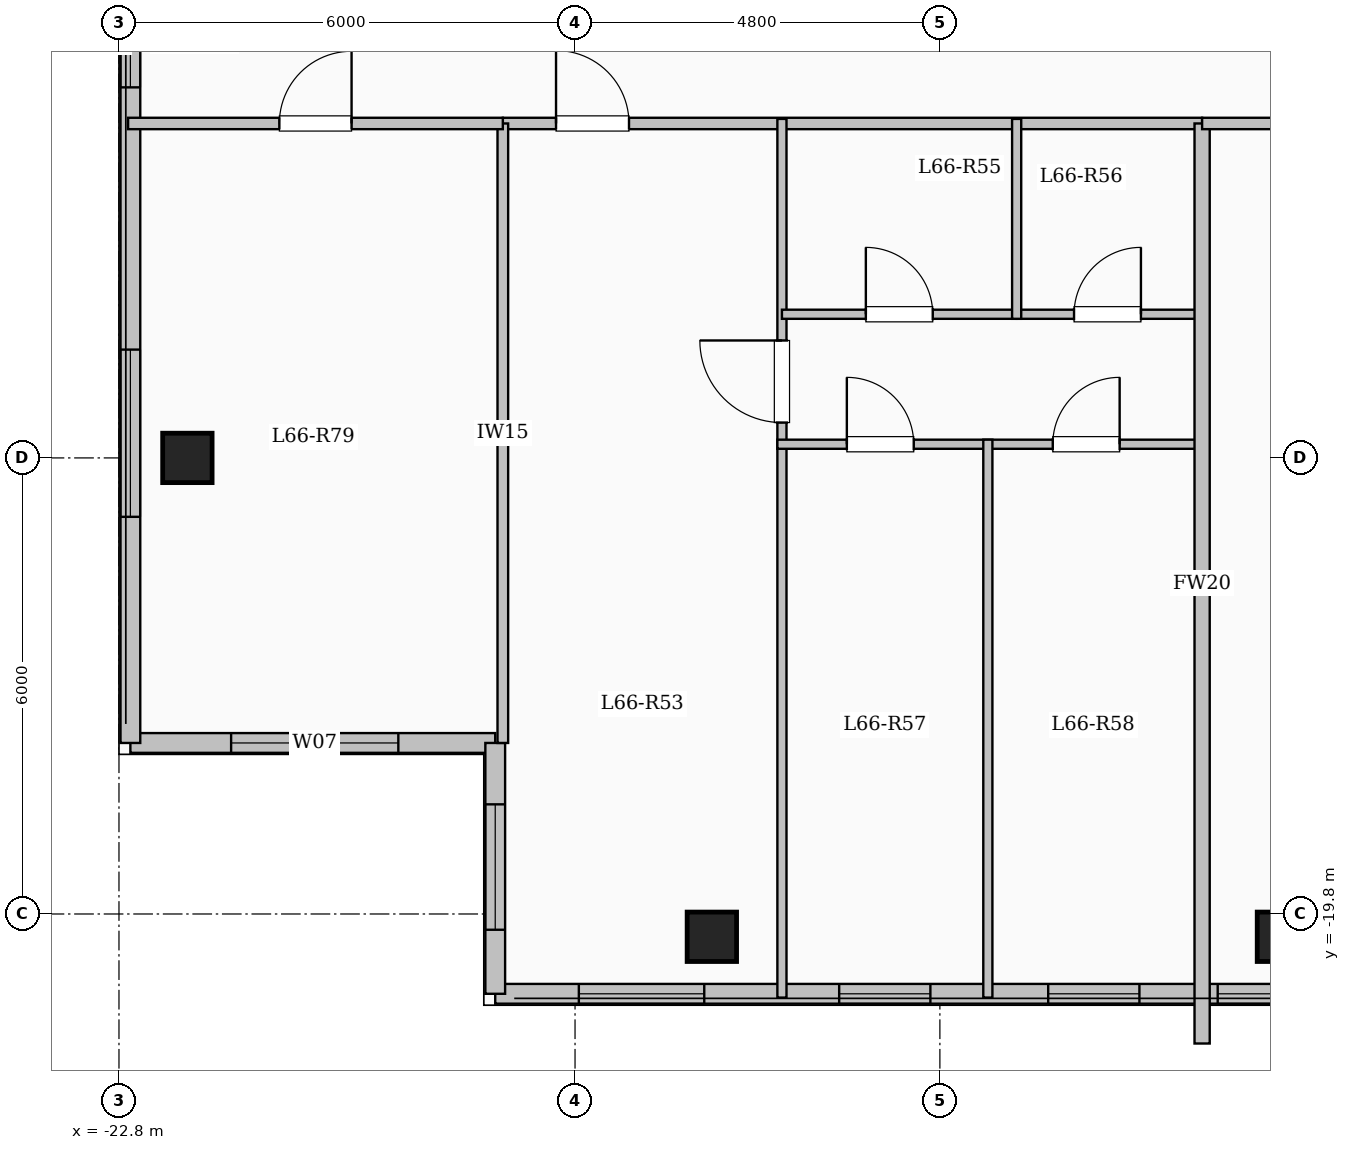
"""IFC4 building model, lengths in metres.
Left out: names, types, materials, properties, quantities, classifications, styles, units other than length and angle.
Written with IfcOpenShell. Run it as: python <this file> out.ifc"""

import sys

from ifc_helpers import new_model, si_unit, direction, frame, frame_2d, origin, origin_2d, place, context, subcontext, project, spatial, rectangle, extrude, element, fill, save


model = new_model("IFC4")
c1 = context("Model", 3, precision=1e-05, world=origin(), true_north=direction((0.0, 1.0)))
c2 = subcontext(c1, "Body", "Model", "MODEL_VIEW")
j1 = project(units=[si_unit("LENGTHUNIT", "METRE"), si_unit("PLANEANGLEUNIT", "RADIAN")], contexts=[c1])
p1 = place(None, origin())
s1 = spatial("IfcSite", under=j1, at=p1, CompositionType="ELEMENT")
p2 = place(p1, origin())
s2 = spatial("IfcBuilding", under=s1, at=p2, CompositionType="ELEMENT")
p3 = place(p2, frame((0.0, 0.0, 244.85)))
s3 = spatial("IfcBuildingStorey", under=s2, at=p3, CompositionType="ELEMENT", Elevation=244.85)
for number, where, z_axis, x_axis in (
    (1, (-15.0, -20.1, 0.0), (0.0, 0.0, 1.0), (1.0, 0.0, 0.0)),
    (2, (-7.5, -20.1, 0.0), (0.0, 0.0, 1.0), (1.0, 0.0, 0.0)),
    (3, (-21.9, -13.8, 0.0), (0.0, 0.0, 1.0), (1.0, 0.0, 0.0)),
):
    element("IfcColumn", number, at=place(p3, frame(where, z_axis=z_axis, x_axis=x_axis)), inside=s3, PredefinedType="COLUMN", context=c2, shape_type="SweptSolid", body=[
        extrude(rectangle(XDim=0.65, YDim=0.65, at=origin_2d()), origin(), (0.0, 0.0, 1.0), 3.35),
    ])
p4 = place(p3, frame((-17.85, -17.55, 0.0), z_axis=(0.0, 0.0, 1.0), x_axis=(-1.0, 0.0, 0.0)))
e4 = element("IfcWall", 4, at=p4, inside=s3, PredefinedType="SOLIDWALL", context=c2, shape_type="SweptSolid", body=[
    extrude(rectangle(XDim=4.8, YDim=0.26, at=frame_2d((2.4, 0.0))), origin(), (0.0, 0.0, 1.0), 3.1),
])
p5 = place(p4, frame((1.275, 0.0, 0.9)))
e5 = element("IfcOpeningElement", 5, at=p5, cuts=e4, PredefinedType="OPENING", context=c2, shape_type="SweptSolid", body=[
    extrude(rectangle(XDim=2.2, YDim=1.75, at=frame_2d((1.1, 0.875))), frame((0.0, 0.14, 0.0), z_axis=(0.0, -1.0, 0.0), x_axis=(1.0, 0.0, 0.0)), (0.0, 0.0, 1.0), 0.28),
])
p6 = place(p3, frame((-22.65, -17.55, 0.0), z_axis=(0.0, 0.0, 1.0), x_axis=(0.0, 1.0, 0.0)))
e6 = element("IfcWall", 6, at=p6, inside=s3, PredefinedType="SOLIDWALL", context=c2, shape_type="SweptSolid", body=[
    extrude(rectangle(XDim=35.1, YDim=0.26, at=frame_2d((17.55, 0.0))), origin(), (0.0, 0.0, 1.0), 3.1),
])
p7 = place(p6, frame((2.975, 0.0, 0.9)))
e7 = element("IfcOpeningElement", 7, at=p7, cuts=e6, PredefinedType="OPENING", context=c2, shape_type="SweptSolid", body=[
    extrude(rectangle(XDim=2.2, YDim=1.75, at=frame_2d((1.1, 0.875))), frame((0.0, 0.14, 0.0), z_axis=(0.0, -1.0, 0.0), x_axis=(1.0, 0.0, 0.0)), (0.0, 0.0, 1.0), 0.28),
])
p8 = place(p6, frame((8.625, 0.0, 0.95)))
e8 = element("IfcOpeningElement", 8, at=p8, cuts=e6, PredefinedType="OPENING", context=c2, shape_type="SweptSolid", body=[
    extrude(rectangle(XDim=1.2, YDim=1.5, at=frame_2d((0.6, 0.75))), frame((0.0, 0.14, 0.0), z_axis=(0.0, -1.0, 0.0), x_axis=(1.0, 0.0, 0.0)), (0.0, 0.0, 1.0), 0.28),
])
p9 = place(p6, frame((13.55, 0.0, 0.9)))
e9 = element("IfcOpeningElement", 9, at=p9, cuts=e6, PredefinedType="OPENING", context=c2, shape_type="SweptSolid", body=[
    extrude(rectangle(XDim=2.2, YDim=1.75, at=frame_2d((1.1, 0.875))), frame((0.0, 0.14, 0.0), z_axis=(0.0, -1.0, 0.0), x_axis=(1.0, 0.0, 0.0)), (0.0, 0.0, 1.0), 0.28),
])
p10 = place(p6, frame((19.95, 0.0, 0.9)))
e10 = element("IfcOpeningElement", 10, at=p10, cuts=e6, PredefinedType="OPENING", context=c2, shape_type="SweptSolid", body=[
    extrude(rectangle(XDim=1.65, YDim=1.6, at=frame_2d((0.825, 0.8))), frame((0.0, 0.14, 0.0), z_axis=(0.0, -1.0, 0.0), x_axis=(1.0, 0.0, 0.0)), (0.0, 0.0, 1.0), 0.28),
])
p11 = place(p6, frame((24.425, 0.0, 0.9)))
e11 = element("IfcOpeningElement", 11, at=p11, cuts=e6, PredefinedType="OPENING", context=c2, shape_type="SweptSolid", body=[
    extrude(rectangle(XDim=2.0, YDim=1.7, at=frame_2d((1.0, 0.85))), frame((0.0, 0.14, 0.0), z_axis=(0.0, -1.0, 0.0), x_axis=(1.0, 0.0, 0.0)), (0.0, 0.0, 1.0), 0.28),
])
p12 = place(p6, frame((28.675, 0.0, 0.95)))
e12 = element("IfcOpeningElement", 12, at=p12, cuts=e6, PredefinedType="OPENING", context=c2, shape_type="SweptSolid", body=[
    extrude(rectangle(XDim=1.0, YDim=1.5, at=frame_2d((0.5, 0.75))), frame((0.0, 0.14, 0.0), z_axis=(0.0, -1.0, 0.0), x_axis=(1.0, 0.0, 0.0)), (0.0, 0.0, 1.0), 0.28),
])
p13 = place(p6, frame((31.6, 0.0, 0.9)))
e13 = element("IfcOpeningElement", 13, at=p13, cuts=e6, PredefinedType="OPENING", context=c2, shape_type="SweptSolid", body=[
    extrude(rectangle(XDim=2.0, YDim=1.7, at=frame_2d((1.0, 0.85))), frame((0.0, 0.14, 0.0), z_axis=(0.0, -1.0, 0.0), x_axis=(1.0, 0.0, 0.0)), (0.0, 0.0, 1.0), 0.28),
])
p14 = place(p3, frame((-7.35, -20.85, 0.0), z_axis=(0.0, 0.0, 1.0), x_axis=(-1.0, 0.0, 0.0)))
e14 = element("IfcWall", 14, at=p14, inside=s3, PredefinedType="SOLIDWALL", context=c2, shape_type="SweptSolid", body=[
    extrude(rectangle(XDim=10.5, YDim=0.26, at=frame_2d((5.25, 0.0))), origin(), (0.0, 0.0, 1.0), 3.1),
])
p15 = place(p14, frame((0.145, 0.0, 0.95)))
e15 = element("IfcOpeningElement", 15, at=p15, cuts=e14, PredefinedType="OPENING", context=c2, shape_type="SweptSolid", body=[
    extrude(rectangle(XDim=0.85, YDim=1.5, at=frame_2d((0.425, 0.75))), frame((0.0, 0.14, 0.0), z_axis=(0.0, -1.0, 0.0), x_axis=(1.0, 0.0, 0.0)), (0.0, 0.0, 1.0), 0.28),
])
p16 = place(p14, frame((2.025, 0.0, 0.95)))
e16 = element("IfcOpeningElement", 16, at=p16, cuts=e14, PredefinedType="OPENING", context=c2, shape_type="SweptSolid", body=[
    extrude(rectangle(XDim=1.2, YDim=1.5, at=frame_2d((0.6, 0.75))), frame((0.0, 0.14, 0.0), z_axis=(0.0, -1.0, 0.0), x_axis=(1.0, 0.0, 0.0)), (0.0, 0.0, 1.0), 0.28),
])
p17 = place(p14, frame((4.775, 0.0, 0.95)))
e17 = element("IfcOpeningElement", 17, at=p17, cuts=e14, PredefinedType="OPENING", context=c2, shape_type="SweptSolid", body=[
    extrude(rectangle(XDim=1.2, YDim=1.5, at=frame_2d((0.6, 0.75))), frame((0.0, 0.14, 0.0), z_axis=(0.0, -1.0, 0.0), x_axis=(1.0, 0.0, 0.0)), (0.0, 0.0, 1.0), 0.28),
])
p18 = place(p14, frame((7.75, 0.0, 0.9)))
e18 = element("IfcOpeningElement", 18, at=p18, cuts=e14, PredefinedType="OPENING", context=c2, shape_type="SweptSolid", body=[
    extrude(rectangle(XDim=1.65, YDim=1.6, at=frame_2d((0.825, 0.8))), frame((0.0, 0.14, 0.0), z_axis=(0.0, -1.0, 0.0), x_axis=(1.0, 0.0, 0.0)), (0.0, 0.0, 1.0), 0.28),
])
p19 = place(p3, frame((-17.85, -20.85, 0.0), z_axis=(0.0, 0.0, 1.0), x_axis=(0.0, 1.0, 0.0)))
e19 = element("IfcWall", 19, at=p19, inside=s3, PredefinedType="SOLIDWALL", context=c2, shape_type="SweptSolid", body=[
    extrude(rectangle(XDim=3.3, YDim=0.26, at=frame_2d((1.65, 0.0))), origin(), (0.0, 0.0, 1.0), 3.1),
])
p20 = place(p19, frame((0.843, 0.0, 0.9)))
e20 = element("IfcOpeningElement", 20, at=p20, cuts=e19, PredefinedType="OPENING", context=c2, shape_type="SweptSolid", body=[
    extrude(rectangle(XDim=1.65, YDim=1.6, at=frame_2d((0.825, 0.8))), frame((0.0, 0.14, 0.0), z_axis=(0.0, -1.0, 0.0), x_axis=(1.0, 0.0, 0.0)), (0.0, 0.0, 1.0), 0.28),
])
p21 = place(p3, frame((-17.75, -9.4, 0.0), z_axis=(0.0, 0.0, 1.0), x_axis=(1.0, 0.0, 0.0)))
e21 = element("IfcWall", 21, at=p21, inside=s3, PredefinedType="PARTITIONING", context=c2, shape_type="SweptSolid", body=[
    extrude(rectangle(XDim=9.2, YDim=0.15, at=frame_2d((4.6, 0.0))), origin(), (0.0, 0.0, 1.0), 3.1),
])
p22 = place(p21, frame((0.7, 0.0, 0.0)))
e22 = element("IfcOpeningElement", 22, at=p22, cuts=e21, PredefinedType="OPENING", context=c2, shape_type="SweptSolid", body=[
    extrude(rectangle(XDim=0.96, YDim=2.15, at=frame_2d((0.48, 1.075))), frame((0.0, 0.085, 0.0), z_axis=(0.0, -1.0, 0.0), x_axis=(1.0, 0.0, 0.0)), (0.0, 0.0, 1.0), 0.17),
])
p23 = place(p3, frame((-14.078, -20.9, 0.0), z_axis=(0.0, 0.0, 1.0), x_axis=(0.0, 1.0, 0.0)))
e23 = element("IfcWall", 23, at=p23, inside=s3, PredefinedType="PARTITIONING", context=c2, shape_type="SweptSolid", body=[
    extrude(rectangle(XDim=11.56, YDim=0.12, at=frame_2d((5.78, 0.0))), origin(), (0.0, 0.0, 1.0), 3.1),
])
p24 = place(p23, frame((7.565, 0.0, 0.0)))
e24 = element("IfcOpeningElement", 24, at=p24, cuts=e23, PredefinedType="OPENING", context=c2, shape_type="SweptSolid", body=[
    extrude(rectangle(XDim=1.08, YDim=2.15, at=frame_2d((0.54, 1.075))), frame((0.0, 0.07, 0.0), z_axis=(0.0, -1.0, 0.0), x_axis=(1.0, 0.0, 0.0)), (0.0, 0.0, 1.0), 0.14),
])
p25 = place(p3, frame((-14.078, -11.91, 0.0), z_axis=(0.0, 0.0, 1.0), x_axis=(1.0, 0.0, 0.0)))
e25 = element("IfcWall", 25, at=p25, inside=s3, PredefinedType="PARTITIONING", context=c2, shape_type="SweptSolid", body=[
    extrude(rectangle(XDim=3.088, YDim=0.12, at=frame_2d((1.544, 0.0))), origin(), (0.0, 0.0, 1.0), 3.1),
])
p26 = place(p25, frame((1.104, 0.0, 0.0)))
e26 = element("IfcOpeningElement", 26, at=p26, cuts=e25, PredefinedType="OPENING", context=c2, shape_type="SweptSolid", body=[
    extrude(rectangle(XDim=0.88, YDim=2.1, at=frame_2d((0.44, 1.05))), frame((0.0, 0.07, 0.0), z_axis=(0.0, -1.0, 0.0), x_axis=(1.0, 0.0, 0.0)), (0.0, 0.0, 1.0), 0.14),
])
p27 = place(p3, frame((-10.99, -11.91, 0.0), z_axis=(0.0, 0.0, 1.0), x_axis=(1.0, 0.0, 0.0)))
e27 = element("IfcWall", 27, at=p27, inside=s3, PredefinedType="PARTITIONING", context=c2, shape_type="SweptSolid", body=[
    extrude(rectangle(XDim=2.39, YDim=0.12, at=frame_2d((1.195, 0.0))), origin(), (0.0, 0.0, 1.0), 3.1),
])
p28 = place(p27, frame((0.755, 0.0, 0.0)))
e28 = element("IfcOpeningElement", 28, at=p28, cuts=e27, PredefinedType="OPENING", context=c2, shape_type="SweptSolid", body=[
    extrude(rectangle(XDim=0.88, YDim=2.1, at=frame_2d((0.44, 1.05))), frame((0.0, 0.07, 0.0), z_axis=(0.0, -1.0, 0.0), x_axis=(1.0, 0.0, 0.0)), (0.0, 0.0, 1.0), 0.14),
])
p29 = place(p3, frame((-14.138, -13.62, 0.0), z_axis=(0.0, 0.0, 1.0), x_axis=(1.0, 0.0, 0.0)))
e29 = element("IfcWall", 29, at=p29, inside=s3, PredefinedType="PARTITIONING", context=c2, shape_type="SweptSolid", body=[
    extrude(rectangle(XDim=5.598, YDim=0.12, at=frame_2d((2.799, 0.0))), origin(), (0.0, 0.0, 1.0), 3.1),
])
p30 = place(p29, frame((0.914, 0.0, 0.0)))
e30 = element("IfcOpeningElement", 30, at=p30, cuts=e29, PredefinedType="OPENING", context=c2, shape_type="SweptSolid", body=[
    extrude(rectangle(XDim=0.88, YDim=2.1, at=frame_2d((0.44, 1.05))), frame((0.0, 0.07, 0.0), z_axis=(0.0, -1.0, 0.0), x_axis=(1.0, 0.0, 0.0)), (0.0, 0.0, 1.0), 0.14),
])
p31 = place(p29, frame((3.623, 0.0, 0.0)))
e31 = element("IfcOpeningElement", 31, at=p31, cuts=e29, PredefinedType="OPENING", context=c2, shape_type="SweptSolid", body=[
    extrude(rectangle(XDim=0.88, YDim=2.1, at=frame_2d((0.44, 1.05))), frame((0.0, 0.07, 0.0), z_axis=(0.0, -1.0, 0.0), x_axis=(1.0, 0.0, 0.0)), (0.0, 0.0, 1.0), 0.14),
])
p32 = place(p3, frame((-10.99, -11.97, 0.0), z_axis=(0.0, 0.0, 1.0), x_axis=(0.0, 1.0, 0.0)))
e32 = element("IfcWall", 32, at=p32, inside=s3, PredefinedType="PARTITIONING", context=c2, shape_type="SweptSolid", body=[
    extrude(rectangle(XDim=2.63, YDim=0.12, at=frame_2d((1.315, 0.0))), origin(), (0.0, 0.0, 1.0), 3.1),
])
p33 = place(p3, frame((-11.369, -20.9, 0.0), z_axis=(0.0, 0.0, 1.0), x_axis=(0.0, 1.0, 0.0)))
e33 = element("IfcWall", 33, at=p33, inside=s3, PredefinedType="PARTITIONING", context=c2, shape_type="SweptSolid", body=[
    extrude(rectangle(XDim=7.34, YDim=0.12, at=frame_2d((3.67, 0.0))), origin(), (0.0, 0.0, 1.0), 3.1),
])
p34 = place(p3, frame((-8.55, -21.504, 0.0), z_axis=(0.0, 0.0, 1.0), x_axis=(0.0, 1.0, 0.0)))
e34 = element("IfcWall", 34, at=p34, inside=s3, PredefinedType="SOLIDWALL", context=c2, shape_type="SweptSolid", body=[
    extrude(rectangle(XDim=12.104, YDim=0.2, at=frame_2d((6.052, 0.0))), origin(), (0.0, 0.0, 1.0), 3.1),
])
p35 = place(p3, frame((-8.55, -9.4, 0.0), z_axis=(0.0, 0.0, 1.0), x_axis=(1.0, 0.0, 0.0)))
e35 = element("IfcWall", 35, at=p35, inside=s3, PredefinedType="PARTITIONING", context=c2, shape_type="SweptSolid", body=[
    extrude(rectangle(XDim=17.1, YDim=0.15, at=frame_2d((8.55, 0.0))), origin(), (0.0, 0.0, 1.0), 3.1),
])
p36 = place(p35, frame((1.75, 0.0, 0.0)))
e36 = element("IfcOpeningElement", 36, at=p36, cuts=e35, PredefinedType="OPENING", context=c2, shape_type="SweptSolid", body=[
    extrude(rectangle(XDim=0.96, YDim=2.15, at=frame_2d((0.48, 1.075))), frame((0.0, 0.085, 0.0), z_axis=(0.0, -1.0, 0.0), x_axis=(1.0, 0.0, 0.0)), (0.0, 0.0, 1.0), 0.17),
])
p37 = place(p3, frame((-17.75, -17.55, 0.0), z_axis=(0.0, 0.0, 1.0), x_axis=(0.0, 1.0, 0.0)))
e37 = element("IfcWall", 37, at=p37, inside=s3, PredefinedType="PARTITIONING", context=c2, shape_type="SweptSolid", body=[
    extrude(rectangle(XDim=8.15, YDim=0.14, at=frame_2d((4.075, 0.0))), origin(), (0.0, 0.0, 1.0), 3.1),
])
p38 = place(p3, frame((-22.68, -9.4, 0.0), z_axis=(0.0, 0.0, 1.0), x_axis=(1.0, 0.0, 0.0)))
e38 = element("IfcWall", 38, at=p38, inside=s3, PredefinedType="PARTITIONING", context=c2, shape_type="SweptSolid", body=[
    extrude(rectangle(XDim=4.93, YDim=0.15, at=frame_2d((2.465, 0.0))), origin(), (0.0, 0.0, 1.0), 3.1),
])
p39 = place(p38, frame((1.99, 0.0, 0.0)))
e39 = element("IfcOpeningElement", 39, at=p39, cuts=e38, PredefinedType="OPENING", context=c2, shape_type="SweptSolid", body=[
    extrude(rectangle(XDim=0.95, YDim=2.15, at=frame_2d((0.475, 1.075))), frame((0.0, 0.085, 0.0), z_axis=(0.0, -1.0, 0.0), x_axis=(1.0, 0.0, 0.0)), (0.0, 0.0, 1.0), 0.17),
])
p40 = place(p5, origin())
e40 = element("IfcWindow", 40, at=p40, inside=s3, PartitioningType="SINGLE_PANEL", PredefinedType="WINDOW", context=c2, shape_type="SweptSolid", body=[
    extrude(rectangle(XDim=2.2, YDim=1.75, at=frame_2d((1.1, 0.875))), frame((0.0, 0.03, 0.0), z_axis=(0.0, -1.0, 0.0), x_axis=(1.0, 0.0, 0.0)), (0.0, 0.0, 1.0), 0.06),
])
fill(e5, e40)
p41 = place(p7, origin())
e41 = element("IfcWindow", 41, at=p41, inside=s3, PartitioningType="SINGLE_PANEL", PredefinedType="WINDOW", context=c2, shape_type="SweptSolid", body=[
    extrude(rectangle(XDim=2.2, YDim=1.75, at=frame_2d((1.1, 0.875))), frame((0.0, 0.03, 0.0), z_axis=(0.0, -1.0, 0.0), x_axis=(1.0, 0.0, 0.0)), (0.0, 0.0, 1.0), 0.06),
])
fill(e7, e41)
p42 = place(p8, origin())
e42 = element("IfcWindow", 42, at=p42, inside=s3, PartitioningType="SINGLE_PANEL", PredefinedType="WINDOW", context=c2, shape_type="SweptSolid", body=[
    extrude(rectangle(XDim=1.2, YDim=1.5, at=frame_2d((0.6, 0.75))), frame((0.0, 0.03, 0.0), z_axis=(0.0, -1.0, 0.0), x_axis=(1.0, 0.0, 0.0)), (0.0, 0.0, 1.0), 0.06),
])
fill(e8, e42)
p43 = place(p15, origin())
e43 = element("IfcWindow", 43, at=p43, inside=s3, PartitioningType="SINGLE_PANEL", PredefinedType="WINDOW", context=c2, shape_type="SweptSolid", body=[
    extrude(rectangle(XDim=0.85, YDim=1.5, at=frame_2d((0.425, 0.75))), frame((0.0, 0.03, 0.0), z_axis=(0.0, -1.0, 0.0), x_axis=(1.0, 0.0, 0.0)), (0.0, 0.0, 1.0), 0.06),
])
fill(e15, e43)
p44 = place(p16, origin())
e44 = element("IfcWindow", 44, at=p44, inside=s3, PartitioningType="SINGLE_PANEL", PredefinedType="WINDOW", context=c2, shape_type="SweptSolid", body=[
    extrude(rectangle(XDim=1.2, YDim=1.5, at=frame_2d((0.6, 0.75))), frame((0.0, 0.03, 0.0), z_axis=(0.0, -1.0, 0.0), x_axis=(1.0, 0.0, 0.0)), (0.0, 0.0, 1.0), 0.06),
])
fill(e16, e44)
p45 = place(p17, origin())
e45 = element("IfcWindow", 45, at=p45, inside=s3, PartitioningType="SINGLE_PANEL", PredefinedType="WINDOW", context=c2, shape_type="SweptSolid", body=[
    extrude(rectangle(XDim=1.2, YDim=1.5, at=frame_2d((0.6, 0.75))), frame((0.0, 0.03, 0.0), z_axis=(0.0, -1.0, 0.0), x_axis=(1.0, 0.0, 0.0)), (0.0, 0.0, 1.0), 0.06),
])
fill(e17, e45)
p46 = place(p18, origin())
e46 = element("IfcWindow", 46, at=p46, inside=s3, PartitioningType="SINGLE_PANEL", PredefinedType="WINDOW", context=c2, shape_type="SweptSolid", body=[
    extrude(rectangle(XDim=1.65, YDim=1.6, at=frame_2d((0.825, 0.8))), frame((0.0, 0.03, 0.0), z_axis=(0.0, -1.0, 0.0), x_axis=(1.0, 0.0, 0.0)), (0.0, 0.0, 1.0), 0.06),
])
fill(e18, e46)
p47 = place(p20, origin())
e47 = element("IfcWindow", 47, at=p47, inside=s3, PartitioningType="SINGLE_PANEL", PredefinedType="WINDOW", context=c2, shape_type="SweptSolid", body=[
    extrude(rectangle(XDim=1.65, YDim=1.6, at=frame_2d((0.825, 0.8))), frame((0.0, 0.03, 0.0), z_axis=(0.0, -1.0, 0.0), x_axis=(1.0, 0.0, 0.0)), (0.0, 0.0, 1.0), 0.06),
])
fill(e20, e47)
p48 = place(p22, origin())
e48 = element("IfcDoor", 48, at=p48, inside=s3, OperationType="SINGLE_SWING_LEFT", PredefinedType="DOOR", context=c2, shape_type="SweptSolid", body=[
    extrude(rectangle(XDim=0.96, YDim=2.15, at=frame_2d((0.48, 1.075))), frame((0.0, 0.025, 0.0), z_axis=(0.0, -1.0, 0.0), x_axis=(1.0, 0.0, 0.0)), (0.0, 0.0, 1.0), 0.05),
])
fill(e22, e48)
p49 = place(p24, origin())
e49 = element("IfcDoor", 49, at=p49, inside=s3, OperationType="SINGLE_SWING_RIGHT", PredefinedType="DOOR", context=c2, shape_type="SweptSolid", body=[
    extrude(rectangle(XDim=1.08, YDim=2.15, at=frame_2d((0.54, 1.075))), frame((0.0, 0.025, 0.0), z_axis=(0.0, -1.0, 0.0), x_axis=(1.0, 0.0, 0.0)), (0.0, 0.0, 1.0), 0.05),
])
fill(e24, e49)
p50 = place(p26, origin())
e50 = element("IfcDoor", 50, at=p50, inside=s3, OperationType="SINGLE_SWING_LEFT", PredefinedType="DOOR", context=c2, shape_type="SweptSolid", body=[
    extrude(rectangle(XDim=0.88, YDim=2.1, at=frame_2d((0.44, 1.05))), frame((0.0, 0.025, 0.0), z_axis=(0.0, -1.0, 0.0), x_axis=(1.0, 0.0, 0.0)), (0.0, 0.0, 1.0), 0.05),
])
fill(e26, e50)
p51 = place(p28, origin())
e51 = element("IfcDoor", 51, at=p51, inside=s3, OperationType="SINGLE_SWING_RIGHT", PredefinedType="DOOR", context=c2, shape_type="SweptSolid", body=[
    extrude(rectangle(XDim=0.88, YDim=2.1, at=frame_2d((0.44, 1.05))), frame((0.0, 0.025, 0.0), z_axis=(0.0, -1.0, 0.0), x_axis=(1.0, 0.0, 0.0)), (0.0, 0.0, 1.0), 0.05),
])
fill(e28, e51)
p52 = place(p30, origin())
e52 = element("IfcDoor", 52, at=p52, inside=s3, OperationType="SINGLE_SWING_LEFT", PredefinedType="DOOR", context=c2, shape_type="SweptSolid", body=[
    extrude(rectangle(XDim=0.88, YDim=2.1, at=frame_2d((0.44, 1.05))), frame((0.0, 0.025, 0.0), z_axis=(0.0, -1.0, 0.0), x_axis=(1.0, 0.0, 0.0)), (0.0, 0.0, 1.0), 0.05),
])
fill(e30, e52)
p53 = place(p31, origin())
e53 = element("IfcDoor", 53, at=p53, inside=s3, OperationType="SINGLE_SWING_RIGHT", PredefinedType="DOOR", context=c2, shape_type="SweptSolid", body=[
    extrude(rectangle(XDim=0.88, YDim=2.1, at=frame_2d((0.44, 1.05))), frame((0.0, 0.025, 0.0), z_axis=(0.0, -1.0, 0.0), x_axis=(1.0, 0.0, 0.0)), (0.0, 0.0, 1.0), 0.05),
])
fill(e31, e53)
p54 = place(p39, origin())
e54 = element("IfcDoor", 54, at=p54, inside=s3, OperationType="SINGLE_SWING_RIGHT", PredefinedType="DOOR", context=c2, shape_type="SweptSolid", body=[
    extrude(rectangle(XDim=0.95, YDim=2.15, at=frame_2d((0.475, 1.075))), frame((0.0, 0.025, 0.0), z_axis=(0.0, -1.0, 0.0), x_axis=(1.0, 0.0, 0.0)), (0.0, 0.0, 1.0), 0.05),
])
fill(e39, e54)
save(model, sys.argv[1])
